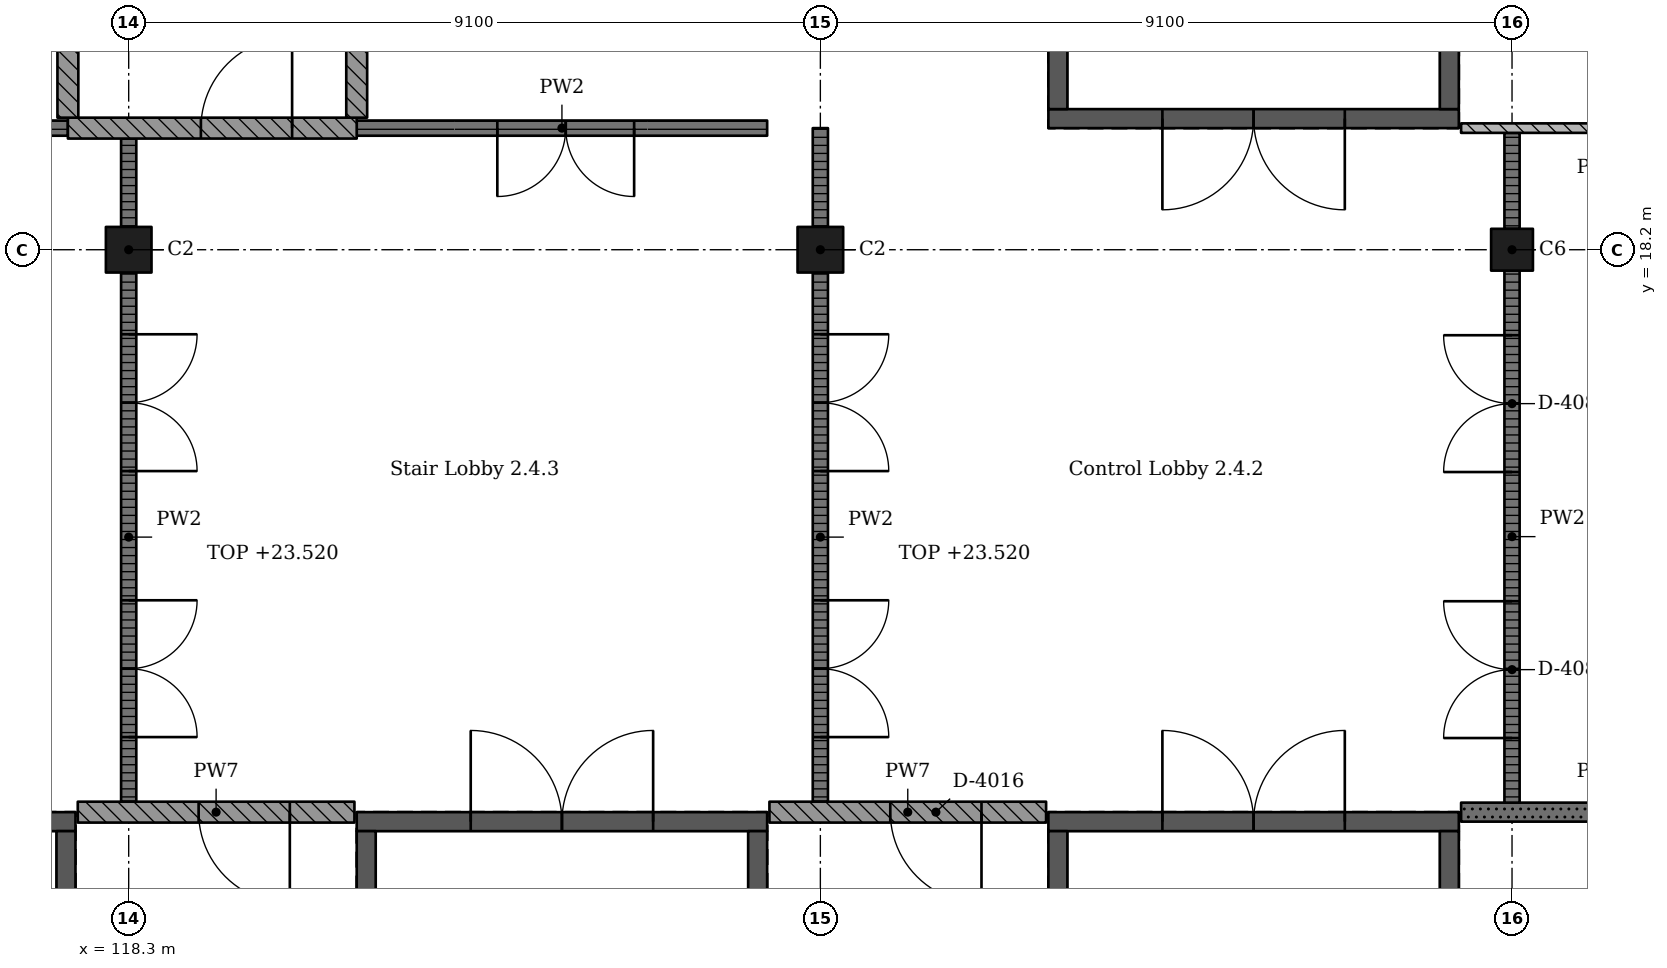
"""IFC4 building model, lengths in metres.
Left out: names, types, materials, properties, quantities, classifications, styles, units other than length and angle.
Written with IfcOpenShell. Run it as: python <this file> out.ifc"""

import sys

from ifc_helpers import new_model, si_unit, direction, frame, frame_2d, origin, origin_2d, place, context, subcontext, project, spatial, rectangle, extrude, element, fill, save


model = new_model("IFC4")
c1 = context("Model", 3, precision=1e-05, world=origin(), true_north=direction((0.0, 1.0)))
c2 = subcontext(c1, "Body", "Model", "MODEL_VIEW")
j1 = project(units=[si_unit("LENGTHUNIT", "METRE"), si_unit("PLANEANGLEUNIT", "RADIAN")], contexts=[c1])
p1 = place(None, origin())
s1 = spatial("IfcSite", under=j1, at=p1, CompositionType="ELEMENT")
p2 = place(p1, origin())
s2 = spatial("IfcBuilding", under=s1, at=p2, CompositionType="ELEMENT")
p3 = place(p2, frame((0.0, 0.0, 20.02)))
s3 = spatial("IfcBuildingStorey", under=s2, at=p3, CompositionType="ELEMENT", Elevation=20.02)
for number, where, z_axis, x_axis in (
    (1, (118.3, 18.2, 0.0), (0.0, 0.0, 1.0), (1.0, 0.0, 0.0)),
    (2, (127.4, 18.2, 0.0), (0.0, 0.0, 1.0), (1.0, 0.0, 0.0)),
):
    element("IfcColumn", number, at=place(p3, frame(where, z_axis=z_axis, x_axis=x_axis)), inside=s3, PredefinedType="COLUMN", context=c2, shape_type="SweptSolid", body=[
        extrude(rectangle(XDim=0.6, YDim=0.6, at=origin_2d()), origin(), (0.0, 0.0, 1.0), 4.55),
    ])
p4 = place(p3, frame((136.5, 18.2, 0.0), z_axis=(0.0, 0.0, 1.0), x_axis=(1.0, 0.0, 0.0)))
e3 = element("IfcColumn", 3, at=p4, inside=s3, PredefinedType="COLUMN", context=c2, shape_type="SweptSolid", body=[
    extrude(rectangle(XDim=0.55, YDim=0.55, at=origin_2d()), origin(), (0.0, 0.0, 1.0), 4.55),
])
p5 = place(p3, frame((135.8, 10.675, 0.0), z_axis=(0.0, 0.0, 1.0), x_axis=(-1.0, 0.0, 0.0)))
e4 = element("IfcWall", 4, at=p5, inside=s3, PredefinedType="SHEAR", context=c2, shape_type="SweptSolid", body=[
    extrude(rectangle(XDim=5.4, YDim=0.25, at=frame_2d((2.7, 0.0))), origin(), (0.0, 0.0, 1.0), 4.55),
])
p6 = place(p5, frame((1.5, 0.0, 0.0)))
e5 = element("IfcOpeningElement", 5, at=p6, cuts=e4, PredefinedType="OPENING", context=c2, shape_type="SweptSolid", body=[
    extrude(rectangle(XDim=2.4, YDim=2.1, at=frame_2d((1.2, 1.05))), frame((0.0, 0.135, 0.0), z_axis=(0.0, -1.0, 0.0), x_axis=(1.0, 0.0, 0.0)), (0.0, 0.0, 1.0), 0.27),
])
for number, where, z_axis, x_axis in (
    (6, (130.525, 10.55, 0.0), (0.0, 0.0, 1.0), (0.0, -1.0, 0.0)),
    (7, (135.675, 10.55, 0.0), (0.0, 0.0, 1.0), (0.0, -1.0, 0.0)),
):
    element("IfcWall", number, at=place(p3, frame(where, z_axis=z_axis, x_axis=x_axis)), inside=s3, PredefinedType="SHEAR", context=c2, shape_type="SweptSolid", body=[
        extrude(rectangle(XDim=9.6, YDim=0.25, at=frame_2d((4.8, 0.0))), origin(), (0.0, 0.0, 1.0), 4.55),
    ])
p7 = place(p3, frame((126.7, 10.675, 0.0), z_axis=(0.0, 0.0, 1.0), x_axis=(-1.0, 0.0, 0.0)))
e8 = element("IfcWall", 8, at=p7, inside=s3, PredefinedType="SHEAR", context=c2, shape_type="SweptSolid", body=[
    extrude(rectangle(XDim=5.4, YDim=0.25, at=frame_2d((2.7, 0.0))), origin(), (0.0, 0.0, 1.0), 4.55),
])
p8 = place(p7, frame((1.5, 0.0, 0.0)))
e9 = element("IfcOpeningElement", 9, at=p8, cuts=e8, PredefinedType="OPENING", context=c2, shape_type="SweptSolid", body=[
    extrude(rectangle(XDim=2.4, YDim=2.1, at=frame_2d((1.2, 1.05))), frame((0.0, 0.135, 0.0), z_axis=(0.0, -1.0, 0.0), x_axis=(1.0, 0.0, 0.0)), (0.0, 0.0, 1.0), 0.27),
])
for number, where, z_axis, x_axis in (
    (10, (121.425, 10.55, 0.0), (0.0, 0.0, 1.0), (0.0, -1.0, 0.0)),
    (11, (126.575, 10.55, 0.0), (0.0, 0.0, 1.0), (0.0, -1.0, 0.0)),
):
    element("IfcWall", number, at=place(p3, frame(where, z_axis=z_axis, x_axis=x_axis)), inside=s3, PredefinedType="SHEAR", context=c2, shape_type="SweptSolid", body=[
        extrude(rectangle(XDim=9.6, YDim=0.25, at=frame_2d((4.8, 0.0))), origin(), (0.0, 0.0, 1.0), 4.55),
    ])
p9 = place(p3, frame((117.6, 10.675, 0.0), z_axis=(0.0, 0.0, 1.0), x_axis=(-1.0, 0.0, 0.0)))
e12 = element("IfcWall", 12, at=p9, inside=s3, PredefinedType="SHEAR", context=c2, shape_type="SweptSolid", body=[
    extrude(rectangle(XDim=5.4, YDim=0.25, at=frame_2d((2.7, 0.0))), origin(), (0.0, 0.0, 1.0), 4.55),
])
p10 = place(p9, frame((1.5, 0.0, 0.0)))
e13 = element("IfcOpeningElement", 13, at=p10, cuts=e12, PredefinedType="OPENING", context=c2, shape_type="SweptSolid", body=[
    extrude(rectangle(XDim=2.4, YDim=2.1, at=frame_2d((1.2, 1.05))), frame((0.0, 0.135, 0.0), z_axis=(0.0, -1.0, 0.0), x_axis=(1.0, 0.0, 0.0)), (0.0, 0.0, 1.0), 0.27),
])
p11 = place(p3, frame((117.475, 10.55, 0.0), z_axis=(0.0, 0.0, 1.0), x_axis=(0.0, -1.0, 0.0)))
e14 = element("IfcWall", 14, at=p11, inside=s3, PredefinedType="SHEAR", context=c2, shape_type="SweptSolid", body=[
    extrude(rectangle(XDim=9.6, YDim=0.25, at=frame_2d((4.8, 0.0))), origin(), (0.0, 0.0, 1.0), 4.55),
])
p12 = place(p3, frame((135.8, 19.925, 0.0), z_axis=(0.0, 0.0, 1.0), x_axis=(-1.0, 0.0, 0.0)))
e15 = element("IfcWall", 15, at=p12, inside=s3, PredefinedType="SHEAR", context=c2, shape_type="SweptSolid", body=[
    extrude(rectangle(XDim=5.4, YDim=0.25, at=frame_2d((2.7, 0.0))), origin(), (0.0, 0.0, 1.0), 4.55),
])
p13 = place(p12, frame((1.5, 0.0, 0.0)))
e16 = element("IfcOpeningElement", 16, at=p13, cuts=e15, PredefinedType="OPENING", context=c2, shape_type="SweptSolid", body=[
    extrude(rectangle(XDim=2.4, YDim=2.1, at=frame_2d((1.2, 1.05))), frame((0.0, 0.135, 0.0), z_axis=(0.0, -1.0, 0.0), x_axis=(1.0, 0.0, 0.0)), (0.0, 0.0, 1.0), 0.27),
])
for number, where, z_axis, x_axis in (
    (17, (130.525, 29.65, 0.0), (0.0, 0.0, 1.0), (0.0, -1.0, 0.0)),
    (18, (135.675, 29.65, 0.0), (0.0, 0.0, 1.0), (0.0, -1.0, 0.0)),
):
    element("IfcWall", number, at=place(p3, frame(where, z_axis=z_axis, x_axis=x_axis)), inside=s3, PredefinedType="SHEAR", context=c2, shape_type="SweptSolid", body=[
        extrude(rectangle(XDim=9.6, YDim=0.25, at=frame_2d((4.8, 0.0))), origin(), (0.0, 0.0, 1.0), 4.55),
    ])
p14 = place(p3, frame((112.2, 19.8, 0.0), z_axis=(0.0, 0.0, 1.0), x_axis=(1.0, 0.0, 0.0)))
e19 = element("IfcWall", 19, at=p14, inside=s3, PredefinedType="PARTITIONING", context=c2, shape_type="SweptSolid", body=[
    extrude(rectangle(XDim=5.3, YDim=0.2, at=frame_2d((2.65, 0.0))), origin(), (0.0, 0.0, 1.0), 4.25),
])
p15 = place(p14, frame((1.75, 0.0, 0.0)))
e20 = element("IfcOpeningElement", 20, at=p15, cuts=e19, PredefinedType="OPENING", context=c2, shape_type="SweptSolid", body=[
    extrude(rectangle(XDim=1.8, YDim=2.4, at=frame_2d((0.9, 1.2))), frame((0.0, 0.11, 0.0), z_axis=(0.0, -1.0, 0.0), x_axis=(1.0, 0.0, 0.0)), (0.0, 0.0, 1.0), 0.22),
])
p16 = place(p3, frame((117.5, 19.8, 0.0), z_axis=(0.0, 0.0, 1.0), x_axis=(1.0, 0.0, 0.0)))
e21 = element("IfcWall", 21, at=p16, inside=s3, PredefinedType="SOLIDWALL", context=c2, shape_type="SweptSolid", body=[
    extrude(rectangle(XDim=3.8, YDim=0.275, at=frame_2d((1.9, 0.0))), origin(), (0.0, 0.0, 1.0), 4.25),
])
p17 = place(p16, frame((1.75, 0.0, 0.0)))
e22 = element("IfcOpeningElement", 22, at=p17, cuts=e21, PredefinedType="OPENING", context=c2, shape_type="SweptSolid", body=[
    extrude(rectangle(XDim=1.2, YDim=2.4, at=frame_2d((0.6, 1.2))), frame((0.0, 0.147, 0.0), z_axis=(0.0, -1.0, 0.0), x_axis=(1.0, 0.0, 0.0)), (0.0, 0.0, 1.0), 0.295),
])
p18 = place(p3, frame((117.5, 19.938, 0.0), z_axis=(0.0, 0.0, 1.0), x_axis=(0.0, 1.0, 0.0)))
e23 = element("IfcWall", 23, at=p18, inside=s3, PredefinedType="SOLIDWALL", context=c2, shape_type="SweptSolid", body=[
    extrude(rectangle(XDim=2.833, YDim=0.275, at=frame_2d((1.416, 0.0))), origin(), (0.0, 0.0, 1.0), 4.25),
])
p19 = place(p3, frame((117.63, 10.8, 0.0), z_axis=(0.0, 0.0, 1.0), x_axis=(1.0, 0.0, 0.0)))
e24 = element("IfcWall", 24, at=p19, inside=s3, PredefinedType="SOLIDWALL", context=c2, shape_type="SweptSolid", body=[
    extrude(rectangle(XDim=3.64, YDim=0.275, at=frame_2d((1.82, 0.0))), origin(), (0.0, 0.0, 1.0), 4.25),
])
p20 = place(p19, frame((1.59, 0.0, 0.0)))
e25 = element("IfcOpeningElement", 25, at=p20, cuts=e24, PredefinedType="OPENING", context=c2, shape_type="SweptSolid", body=[
    extrude(rectangle(XDim=1.2, YDim=2.4, at=frame_2d((0.6, 1.2))), frame((0.0, 0.147, 0.0), z_axis=(0.0, -1.0, 0.0), x_axis=(1.0, 0.0, 0.0)), (0.0, 0.0, 1.0), 0.295),
])
p21 = place(p3, frame((118.3, 10.938, 0.0), z_axis=(0.0, 0.0, 1.0), x_axis=(0.0, 1.0, 0.0)))
e26 = element("IfcWall", 26, at=p21, inside=s3, PredefinedType="PARTITIONING", context=c2, shape_type="SweptSolid", body=[
    extrude(rectangle(XDim=6.962, YDim=0.2, at=frame_2d((3.481, 0.0))), origin(), (0.0, 0.0, 1.0), 3.5),
])
p22 = place(p21, frame((0.85, 0.0, 0.0)))
e27 = element("IfcOpeningElement", 27, at=p22, cuts=e26, PredefinedType="OPENING", context=c2, shape_type="SweptSolid", body=[
    extrude(rectangle(XDim=1.8, YDim=2.4, at=frame_2d((0.9, 1.2))), frame((0.0, 0.11, 0.0), z_axis=(0.0, -1.0, 0.0), x_axis=(1.0, 0.0, 0.0)), (0.0, 0.0, 1.0), 0.22),
])
p23 = place(p21, frame((4.35, 0.0, 0.0)))
e28 = element("IfcOpeningElement", 28, at=p23, cuts=e26, PredefinedType="OPENING", context=c2, shape_type="SweptSolid", body=[
    extrude(rectangle(XDim=1.8, YDim=2.4, at=frame_2d((0.9, 1.2))), frame((0.0, 0.11, 0.0), z_axis=(0.0, -1.0, 0.0), x_axis=(1.0, 0.0, 0.0)), (0.0, 0.0, 1.0), 0.22),
])
p24 = place(p3, frame((118.3, 18.5, 0.0), z_axis=(0.0, 0.0, 1.0), x_axis=(0.0, 1.0, 0.0)))
e29 = element("IfcWall", 29, at=p24, inside=s3, PredefinedType="PARTITIONING", context=c2, shape_type="SweptSolid", body=[
    extrude(rectangle(XDim=1.163, YDim=0.2, at=frame_2d((0.581, 0.0))), origin(), (0.0, 0.0, 1.0), 3.5),
])
p25 = place(p3, frame((121.3, 19.8, 0.0), z_axis=(0.0, 0.0, 1.0), x_axis=(1.0, 0.0, 0.0)))
e30 = element("IfcWall", 30, at=p25, inside=s3, PredefinedType="PARTITIONING", context=c2, shape_type="SweptSolid", body=[
    extrude(rectangle(XDim=5.4, YDim=0.2, at=frame_2d((2.7, 0.0))), origin(), (0.0, 0.0, 1.0), 4.25),
])
p26 = place(p25, frame((1.85, 0.0, 0.0)))
e31 = element("IfcOpeningElement", 31, at=p26, cuts=e30, PredefinedType="OPENING", context=c2, shape_type="SweptSolid", body=[
    extrude(rectangle(XDim=1.8, YDim=2.4, at=frame_2d((0.9, 1.2))), frame((0.0, 0.11, 0.0), z_axis=(0.0, -1.0, 0.0), x_axis=(1.0, 0.0, 0.0)), (0.0, 0.0, 1.0), 0.22),
])
p27 = place(p3, frame((121.3, 19.938, 0.0), z_axis=(0.0, 0.0, 1.0), x_axis=(0.0, 1.0, 0.0)))
e32 = element("IfcWall", 32, at=p27, inside=s3, PredefinedType="SOLIDWALL", context=c2, shape_type="SweptSolid", body=[
    extrude(rectangle(XDim=6.933, YDim=0.275, at=frame_2d((3.466, 0.0))), origin(), (0.0, 0.0, 1.0), 4.25),
])
p28 = place(p3, frame((126.73, 10.8, 0.0), z_axis=(0.0, 0.0, 1.0), x_axis=(1.0, 0.0, 0.0)))
e33 = element("IfcWall", 33, at=p28, inside=s3, PredefinedType="SOLIDWALL", context=c2, shape_type="SweptSolid", body=[
    extrude(rectangle(XDim=3.64, YDim=0.275, at=frame_2d((1.82, 0.0))), origin(), (0.0, 0.0, 1.0), 4.25),
])
p29 = place(p28, frame((1.59, 0.0, 0.0)))
e34 = element("IfcOpeningElement", 34, at=p29, cuts=e33, PredefinedType="OPENING", context=c2, shape_type="SweptSolid", body=[
    extrude(rectangle(XDim=1.2, YDim=2.4, at=frame_2d((0.6, 1.2))), frame((0.0, 0.147, 0.0), z_axis=(0.0, -1.0, 0.0), x_axis=(1.0, 0.0, 0.0)), (0.0, 0.0, 1.0), 0.295),
])
p30 = place(p3, frame((127.4, 10.938, 0.0), z_axis=(0.0, 0.0, 1.0), x_axis=(0.0, 1.0, 0.0)))
e35 = element("IfcWall", 35, at=p30, inside=s3, PredefinedType="PARTITIONING", context=c2, shape_type="SweptSolid", body=[
    extrude(rectangle(XDim=6.962, YDim=0.2, at=frame_2d((3.481, 0.0))), origin(), (0.0, 0.0, 1.0), 3.5),
])
p31 = place(p30, frame((0.85, 0.0, 0.0)))
e36 = element("IfcOpeningElement", 36, at=p31, cuts=e35, PredefinedType="OPENING", context=c2, shape_type="SweptSolid", body=[
    extrude(rectangle(XDim=1.8, YDim=2.4, at=frame_2d((0.9, 1.2))), frame((0.0, 0.11, 0.0), z_axis=(0.0, -1.0, 0.0), x_axis=(1.0, 0.0, 0.0)), (0.0, 0.0, 1.0), 0.22),
])
p32 = place(p30, frame((4.35, 0.0, 0.0)))
e37 = element("IfcOpeningElement", 37, at=p32, cuts=e35, PredefinedType="OPENING", context=c2, shape_type="SweptSolid", body=[
    extrude(rectangle(XDim=1.8, YDim=2.4, at=frame_2d((0.9, 1.2))), frame((0.0, 0.11, 0.0), z_axis=(0.0, -1.0, 0.0), x_axis=(1.0, 0.0, 0.0)), (0.0, 0.0, 1.0), 0.22),
])
p33 = place(p3, frame((127.4, 18.5, 0.0), z_axis=(0.0, 0.0, 1.0), x_axis=(0.0, 1.0, 0.0)))
e38 = element("IfcWall", 38, at=p33, inside=s3, PredefinedType="PARTITIONING", context=c2, shape_type="SweptSolid", body=[
    extrude(rectangle(XDim=1.3, YDim=0.2, at=frame_2d((0.65, 0.0))), origin(), (0.0, 0.0, 1.0), 3.5),
])
p34 = place(p3, frame((135.83, 19.8, 0.0), z_axis=(0.0, 0.0, 1.0), x_axis=(1.0, 0.0, 0.0)))
e39 = element("IfcWall", 39, at=p34, inside=s3, PredefinedType="PARTITIONING", context=c2, shape_type="SweptSolid", body=[
    extrude(rectangle(XDim=3.64, YDim=0.125, at=frame_2d((1.82, 0.0))), origin(), (0.0, 0.0, 1.0), 4.25),
])
p35 = place(p34, frame((1.72, 0.0, 0.0)))
e40 = element("IfcOpeningElement", 40, at=p35, cuts=e39, PredefinedType="OPENING", context=c2, shape_type="SweptSolid", body=[
    extrude(rectangle(XDim=0.9, YDim=2.1, at=frame_2d((0.45, 1.05))), frame((0.0, 0.073, 0.0), z_axis=(0.0, -1.0, 0.0), x_axis=(1.0, 0.0, 0.0)), (0.0, 0.0, 1.0), 0.145),
])
p36 = place(p3, frame((135.83, 10.8, 0.0), z_axis=(0.0, 0.0, 1.0), x_axis=(1.0, 0.0, 0.0)))
e41 = element("IfcWall", 41, at=p36, inside=s3, PredefinedType="SOLIDWALL", context=c2, shape_type="SweptSolid", body=[
    extrude(rectangle(XDim=3.64, YDim=0.25, at=frame_2d((1.82, 0.0))), origin(), (0.0, 0.0, 1.0), 4.25),
])
p37 = place(p36, frame((1.79, 0.0, 0.0)))
e42 = element("IfcOpeningElement", 42, at=p37, cuts=e41, PredefinedType="OPENING", context=c2, shape_type="SweptSolid", body=[
    extrude(rectangle(XDim=0.8, YDim=2.1, at=frame_2d((0.4, 1.05))), frame((0.0, 0.135, 0.0), z_axis=(0.0, -1.0, 0.0), x_axis=(1.0, 0.0, 0.0)), (0.0, 0.0, 1.0), 0.27),
])
p38 = place(p3, frame((136.5, 10.925, 0.0), z_axis=(0.0, 0.0, 1.0), x_axis=(0.0, 1.0, 0.0)))
e43 = element("IfcWall", 43, at=p38, inside=s3, PredefinedType="PARTITIONING", context=c2, shape_type="SweptSolid", body=[
    extrude(rectangle(XDim=7.0, YDim=0.2, at=frame_2d((3.5, 0.0))), origin(), (0.0, 0.0, 1.0), 3.5),
])
p39 = place(p38, frame((0.85, 0.0, 0.0)))
e44 = element("IfcOpeningElement", 44, at=p39, cuts=e43, PredefinedType="OPENING", context=c2, shape_type="SweptSolid", body=[
    extrude(rectangle(XDim=1.8, YDim=2.4, at=frame_2d((0.9, 1.2))), frame((0.0, 0.11, 0.0), z_axis=(0.0, -1.0, 0.0), x_axis=(1.0, 0.0, 0.0)), (0.0, 0.0, 1.0), 0.22),
])
p40 = place(p38, frame((4.35, 0.0, 0.0)))
e45 = element("IfcOpeningElement", 45, at=p40, cuts=e43, PredefinedType="OPENING", context=c2, shape_type="SweptSolid", body=[
    extrude(rectangle(XDim=1.8, YDim=2.4, at=frame_2d((0.9, 1.2))), frame((0.0, 0.11, 0.0), z_axis=(0.0, -1.0, 0.0), x_axis=(1.0, 0.0, 0.0)), (0.0, 0.0, 1.0), 0.22),
])
p41 = place(p3, frame((136.5, 18.475, 0.0), z_axis=(0.0, 0.0, 1.0), x_axis=(0.0, 1.0, 0.0)))
e46 = element("IfcWall", 46, at=p41, inside=s3, PredefinedType="PARTITIONING", context=c2, shape_type="SweptSolid", body=[
    extrude(rectangle(XDim=1.262, YDim=0.2, at=frame_2d((0.631, 0.0))), origin(), (0.0, 0.0, 1.0), 3.5),
])
p42 = place(p17, origin())
e47 = element("IfcDoor", 47, at=p42, inside=s3, OperationType="SINGLE_SWING_LEFT", PredefinedType="DOOR", context=c2, shape_type="SweptSolid", body=[
    extrude(rectangle(XDim=1.2, YDim=2.4, at=frame_2d((0.6, 1.2))), frame((0.0, 0.025, 0.0), z_axis=(0.0, -1.0, 0.0), x_axis=(1.0, 0.0, 0.0)), (0.0, 0.0, 1.0), 0.05),
])
fill(e22, e47)
p43 = place(p29, origin())
e48 = element("IfcDoor", 48, at=p43, inside=s3, OperationType="SINGLE_SWING_RIGHT", PredefinedType="DOOR", context=c2, shape_type="SweptSolid", body=[
    extrude(rectangle(XDim=1.2, YDim=2.4, at=frame_2d((0.6, 1.2))), frame((0.0, 0.025, 0.0), z_axis=(0.0, -1.0, 0.0), x_axis=(1.0, 0.0, 0.0)), (0.0, 0.0, 1.0), 0.05),
])
fill(e34, e48)
p44 = place(p20, origin())
e49 = element("IfcDoor", 49, at=p44, inside=s3, OperationType="SINGLE_SWING_RIGHT", PredefinedType="DOOR", context=c2, shape_type="SweptSolid", body=[
    extrude(rectangle(XDim=1.2, YDim=2.4, at=frame_2d((0.6, 1.2))), frame((0.0, 0.025, 0.0), z_axis=(0.0, -1.0, 0.0), x_axis=(1.0, 0.0, 0.0)), (0.0, 0.0, 1.0), 0.05),
])
fill(e25, e49)
p45 = place(p39, origin())
e50 = element("IfcDoor", 50, at=p45, inside=s3, OperationType="DOUBLE_DOOR_SINGLE_SWING", PredefinedType="DOOR", context=c2, shape_type="SweptSolid", body=[
    extrude(rectangle(XDim=1.8, YDim=2.4, at=frame_2d((0.9, 1.2))), frame((0.0, 0.025, 0.0), z_axis=(0.0, -1.0, 0.0), x_axis=(1.0, 0.0, 0.0)), (0.0, 0.0, 1.0), 0.05),
])
fill(e44, e50)
p46 = place(p40, origin())
e51 = element("IfcDoor", 51, at=p46, inside=s3, OperationType="DOUBLE_DOOR_SINGLE_SWING", PredefinedType="DOOR", context=c2, shape_type="SweptSolid", body=[
    extrude(rectangle(XDim=1.8, YDim=2.4, at=frame_2d((0.9, 1.2))), frame((0.0, 0.025, 0.0), z_axis=(0.0, -1.0, 0.0), x_axis=(1.0, 0.0, 0.0)), (0.0, 0.0, 1.0), 0.05),
])
fill(e45, e51)
p47 = place(p31, origin())
e52 = element("IfcDoor", 52, at=p47, inside=s3, OperationType="DOUBLE_DOOR_SINGLE_SWING", PredefinedType="DOOR", context=c2, shape_type="SweptSolid", body=[
    extrude(rectangle(XDim=1.8, YDim=2.4, at=frame_2d((0.9, 1.2))), frame((0.0, 0.025, 0.0), z_axis=(0.0, -1.0, 0.0), x_axis=(1.0, 0.0, 0.0)), (0.0, 0.0, 1.0), 0.05),
])
fill(e36, e52)
p48 = place(p32, origin())
e53 = element("IfcDoor", 53, at=p48, inside=s3, OperationType="DOUBLE_DOOR_SINGLE_SWING", PredefinedType="DOOR", context=c2, shape_type="SweptSolid", body=[
    extrude(rectangle(XDim=1.8, YDim=2.4, at=frame_2d((0.9, 1.2))), frame((0.0, 0.025, 0.0), z_axis=(0.0, -1.0, 0.0), x_axis=(1.0, 0.0, 0.0)), (0.0, 0.0, 1.0), 0.05),
])
fill(e37, e53)
p49 = place(p22, origin())
e54 = element("IfcDoor", 54, at=p49, inside=s3, OperationType="DOUBLE_DOOR_SINGLE_SWING", PredefinedType="DOOR", context=c2, shape_type="SweptSolid", body=[
    extrude(rectangle(XDim=1.8, YDim=2.4, at=frame_2d((0.9, 1.2))), frame((0.0, 0.025, 0.0), z_axis=(0.0, -1.0, 0.0), x_axis=(1.0, 0.0, 0.0)), (0.0, 0.0, 1.0), 0.05),
])
fill(e27, e54)
p50 = place(p23, origin())
e55 = element("IfcDoor", 55, at=p50, inside=s3, OperationType="DOUBLE_DOOR_SINGLE_SWING", PredefinedType="DOOR", context=c2, shape_type="SweptSolid", body=[
    extrude(rectangle(XDim=1.8, YDim=2.4, at=frame_2d((0.9, 1.2))), frame((0.0, 0.025, 0.0), z_axis=(0.0, -1.0, 0.0), x_axis=(1.0, 0.0, 0.0)), (0.0, 0.0, 1.0), 0.05),
])
fill(e28, e55)
p51 = place(p26, origin())
e56 = element("IfcDoor", 56, at=p51, inside=s3, OperationType="DOUBLE_DOOR_SINGLE_SWING", PredefinedType="DOOR", context=c2, shape_type="SweptSolid", body=[
    extrude(rectangle(XDim=1.8, YDim=2.4, at=frame_2d((0.9, 1.2))), frame((0.0, 0.025, 0.0), z_axis=(0.0, -1.0, 0.0), x_axis=(1.0, 0.0, 0.0)), (0.0, 0.0, 1.0), 0.05),
])
fill(e31, e56)
p52 = place(p6, origin())
e57 = element("IfcDoor", 57, at=p52, inside=s3, OperationType="DOUBLE_DOOR_SINGLE_SWING", PredefinedType="DOOR", context=c2, shape_type="SweptSolid", body=[
    extrude(rectangle(XDim=2.4, YDim=2.1, at=frame_2d((1.2, 1.05))), frame((0.0, 0.025, 0.0), z_axis=(0.0, -1.0, 0.0), x_axis=(1.0, 0.0, 0.0)), (0.0, 0.0, 1.0), 0.05),
])
fill(e5, e57)
p53 = place(p8, origin())
e58 = element("IfcDoor", 58, at=p53, inside=s3, OperationType="DOUBLE_DOOR_SINGLE_SWING", PredefinedType="DOOR", context=c2, shape_type="SweptSolid", body=[
    extrude(rectangle(XDim=2.4, YDim=2.1, at=frame_2d((1.2, 1.05))), frame((0.0, 0.025, 0.0), z_axis=(0.0, -1.0, 0.0), x_axis=(1.0, 0.0, 0.0)), (0.0, 0.0, 1.0), 0.05),
])
fill(e9, e58)
p54 = place(p13, origin())
e59 = element("IfcDoor", 59, at=p54, inside=s3, OperationType="DOUBLE_DOOR_SINGLE_SWING", PredefinedType="DOOR", context=c2, shape_type="SweptSolid", body=[
    extrude(rectangle(XDim=2.4, YDim=2.1, at=frame_2d((1.2, 1.05))), frame((0.0, 0.025, 0.0), z_axis=(0.0, -1.0, 0.0), x_axis=(1.0, 0.0, 0.0)), (0.0, 0.0, 1.0), 0.05),
])
fill(e16, e59)
save(model, sys.argv[1])
